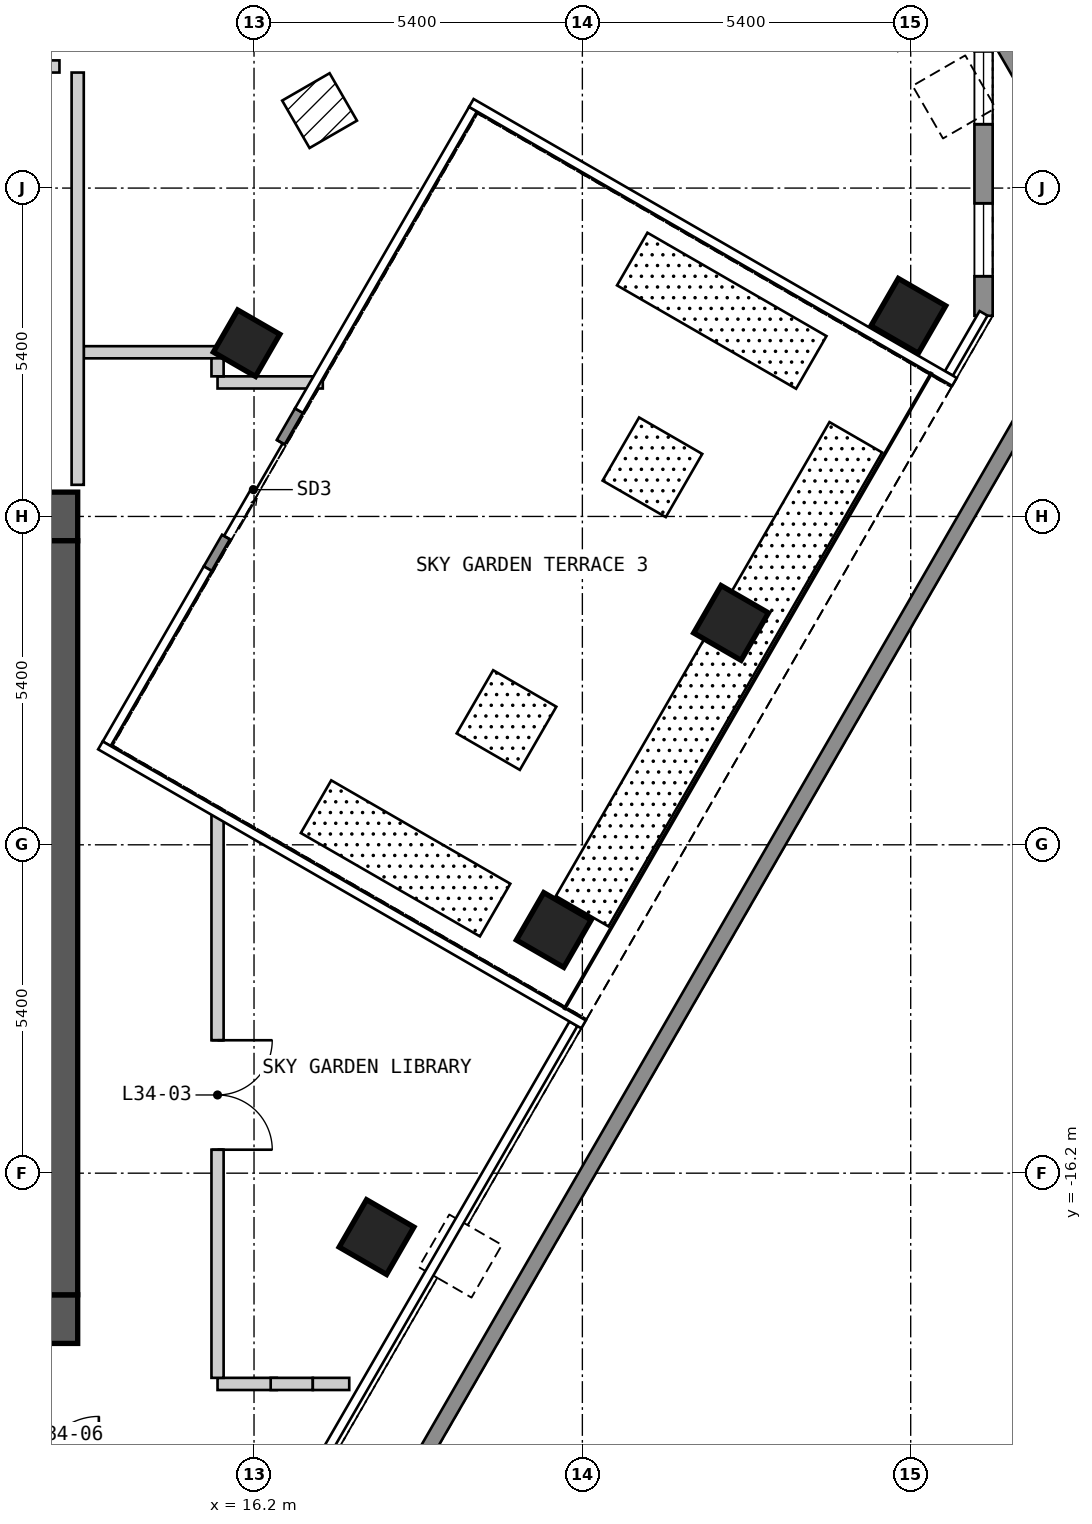
"""IFC4 building model, lengths in metres.
Left out: names, types, materials, properties, quantities, classifications, styles, units other than length and angle.
Written with IfcOpenShell. Run it as: python <this file> out.ifc"""

import sys

from ifc_helpers import new_model, si_unit, direction, frame, frame_2d, origin, origin_2d, place, context, subcontext, project, spatial, polyline, rectangle, outline, extrude, element, fill, save


model = new_model("IFC4")
c1 = context("Model", 3, precision=1e-05, world=origin(), true_north=direction((0.0, 1.0)))
c2 = subcontext(c1, "Body", "Model", "MODEL_VIEW")
j1 = project(units=[si_unit("LENGTHUNIT", "METRE"), si_unit("PLANEANGLEUNIT", "RADIAN")], contexts=[c1])
p1 = place(None, origin())
s1 = spatial("IfcSite", under=j1, at=p1, CompositionType="ELEMENT")
p2 = place(p1, origin())
s2 = spatial("IfcBuilding", under=s1, at=p2, CompositionType="ELEMENT")
p3 = place(p2, frame((0.0, 0.0, 111.6)))
s3 = spatial("IfcBuildingStorey", under=s2, at=p3, CompositionType="ELEMENT", Elevation=111.6)
for number, where, z_axis, x_axis in (
    (1, (18.215, -17.251, 0.0), (0.0, 0.0, 1.0), (0.5, 0.866, 0.0)),
    (2, (21.13, -12.201, 0.0), (0.0, 0.0, 1.0), (0.5, 0.866, 0.0)),
    (3, (24.046, -7.151, 0.0), (0.0, 0.0, 1.0), (0.5, 0.866, 0.0)),
    (4, (26.961, -2.101, 0.0), (0.0, 0.0, 1.0), (0.5, 0.866, 0.0)),
):
    element("IfcColumn", number, at=place(p3, frame(where, z_axis=z_axis, x_axis=x_axis)), inside=s3, PredefinedType="COLUMN", context=c2, shape_type="SweptSolid", body=[
        extrude(rectangle(XDim=0.9, YDim=0.9, at=origin_2d()), origin(), (0.0, 0.0, 1.0), 6.0),
    ])
p4 = place(p3, frame((16.078, -2.551, 0.0), z_axis=(0.0, 0.0, 1.0), x_axis=(0.5, 0.866025403784, 0.0)))
e5 = element("IfcColumn", 5, at=p4, inside=s3, PredefinedType="COLUMN", context=c2, shape_type="SweptSolid", body=[
    extrude(rectangle(XDim=0.8, YDim=0.8, at=origin_2d()), origin(), (0.0, 0.0, 1.0), 6.0),
])
p5 = place(p3, frame((-13.3, -18.6, 0.0), z_axis=(0.0, 0.0, 1.0), x_axis=(1.0, 0.0, 0.0)))
e6 = element("IfcWall", 6, at=p5, inside=s3, PredefinedType="SHEAR", context=c2, shape_type="SweptSolid", body=[
    extrude(rectangle(XDim=26.6, YDim=0.8, at=frame_2d((13.3, 0.0))), origin(), (0.0, 0.0, 1.0), 5.7),
])
p6 = place(p3, frame((-13.3, -5.4, 0.0), z_axis=(0.0, 0.0, 1.0), x_axis=(1.0, 0.0, 0.0)))
e7 = element("IfcWall", 7, at=p6, inside=s3, PredefinedType="SHEAR", context=c2, shape_type="SweptSolid", body=[
    extrude(rectangle(XDim=26.6, YDim=0.8, at=frame_2d((13.3, 0.0))), origin(), (0.0, 0.0, 1.0), 5.7),
])
p7 = place(p6, frame((23.65, 0.0, 0.0)))
e8 = element("IfcOpeningElement", 8, at=p7, cuts=e7, PredefinedType="OPENING", context=c2, shape_type="SweptSolid", body=[
    extrude(rectangle(XDim=1.2, YDim=2.1, at=frame_2d((0.6, 1.05))), frame((0.0, 0.41, 0.0), z_axis=(0.0, -1.0, 0.0), x_axis=(1.0, 0.0, 0.0)), (0.0, 0.0, 1.0), 0.82),
])
p8 = place(p3, frame((12.9, -18.2, 0.0), z_axis=(0.0, 0.0, 1.0), x_axis=(0.0, 1.0, 0.0)))
e9 = element("IfcWall", 9, at=p8, inside=s3, PredefinedType="SHEAR", context=c2, shape_type="SweptSolid", body=[
    extrude(rectangle(XDim=12.4, YDim=0.8, at=frame_2d((6.2, 0.0))), origin(), (0.0, 0.0, 1.0), 5.7),
])
p9 = place(p3, frame((28.198, -2.1, 0.0), z_axis=(0.0, 0.0, 1.0), x_axis=(0.0, 1.0, 0.0)))
e10 = element("IfcWall", 10, at=p9, inside=s3, PredefinedType="SOLIDWALL", context=c2, shape_type="SweptSolid", body=[
    extrude(outline(polyline([(0.0, -0.15), (5.0, -0.15), (4.92, 0.15), (0.08, 0.15), (0.0, -0.15)])), origin(), (0.0, 0.0, 1.0), 5.7),
])
p10 = place(p9, frame((0.65, 0.0, 0.15)))
e11 = element("IfcOpeningElement", 11, at=p10, cuts=e10, PredefinedType="OPENING", context=c2, shape_type="SweptSolid", body=[
    extrude(rectangle(XDim=1.2, YDim=2.1, at=frame_2d((0.6, 1.05))), frame((0.0, 0.16, 0.0), z_axis=(0.0, -1.0, 0.0), x_axis=(1.0, 0.0, 0.0)), (0.0, 0.0, 1.0), 0.32),
])
p11 = place(p9, frame((3.15, 0.0, 0.15)))
e12 = element("IfcOpeningElement", 12, at=p11, cuts=e10, PredefinedType="OPENING", context=c2, shape_type="SweptSolid", body=[
    extrude(rectangle(XDim=1.2, YDim=2.1, at=frame_2d((0.6, 1.05))), frame((0.0, 0.16, 0.0), z_axis=(0.0, -1.0, 0.0), x_axis=(1.0, 0.0, 0.0)), (0.0, 0.0, 1.0), 0.32),
])
p12 = place(p3, frame((15.439, -6.258, 0.0), z_axis=(0.0, 0.0, 1.0), x_axis=(0.499990139034, 0.866031096941, 0.0)))
e13 = element("IfcWall", 13, at=p12, inside=s3, PredefinedType="SOLIDWALL", context=c2, shape_type="SweptSolid", body=[
    extrude(rectangle(XDim=3.0, YDim=0.15, at=frame_2d((1.5, 0.0))), origin(), (0.0, 0.0, 1.0), 5.7),
])
p13 = place(p12, frame((0.6, 0.0, 0.0)))
e14 = element("IfcOpeningElement", 14, at=p13, cuts=e13, PredefinedType="OPENING", context=c2, shape_type="SweptSolid", body=[
    extrude(rectangle(XDim=1.8, YDim=2.4, at=frame_2d((0.9, 1.2))), frame((0.0, 0.085, 0.0), z_axis=(0.0, -1.0, 0.0), x_axis=(1.0, 0.0, 0.0)), (0.0, 0.0, 1.0), 0.17),
])
p14 = place(p3, frame((28.299, 2.736, 0.0), z_axis=(0.0, 0.0, 1.0), x_axis=(0.500272171574, -0.865868208418, 0.0)))
e15 = element("IfcWall", 15, at=p14, inside=s3, PredefinedType="PARAPET", context=c2, shape_type="SweptSolid", body=[
    extrude(outline(polyline([(0.0, -0.125), (1.432, -0.125), (1.499, 0.125), (0.0, 0.125), (0.0, -0.125)])), origin(), (0.0, 0.0, 1.0), 1.6),
])
p15 = place(p3, frame((29.049, -3.438, 0.0), z_axis=(0.0, 0.0, 1.0), x_axis=(-0.500085431376, -0.865976074338, 0.0)))
e16 = element("IfcWall", 16, at=p15, inside=s3, PredefinedType="PARAPET", context=c2, shape_type="SweptSolid", body=[
    extrude(outline(polyline([(0.067, -0.125), (23.027, -0.125), (23.094, 0.125), (0.0, 0.125), (0.067, -0.125)])), origin(), (0.0, 0.0, 1.0), 1.6),
])
p16 = place(p3, frame((15.6, -19.666, 0.0), z_axis=(0.0, 0.0, 1.0), x_axis=(1.0, 0.0, 0.0)))
e17 = element("IfcWall", 17, at=p16, inside=s3, PredefinedType="PARTITIONING", context=c2, shape_type="SweptSolid", body=[
    extrude(rectangle(XDim=0.974, YDim=0.2, at=frame_2d((0.487, 0.0))), origin(), (0.0, 0.0, 1.0), 5.7),
])
p17 = place(p3, frame((16.474, -19.666, 0.0), z_axis=(0.0, 0.0, 1.0), x_axis=(1.0, 0.0, 0.0)))
e18 = element("IfcWall", 18, at=p17, inside=s3, PredefinedType="PARTITIONING", context=c2, shape_type="SweptSolid", body=[
    extrude(rectangle(XDim=0.693, YDim=0.2, at=frame_2d((0.346, 0.0))), origin(), (0.0, 0.0, 1.0), 5.07),
])
p18 = place(p3, frame((17.167, -19.666, 0.0), z_axis=(0.0, 0.0, 1.0), x_axis=(1.0, 0.0, 0.0)))
e19 = element("IfcWall", 19, at=p18, inside=s3, PredefinedType="PARTITIONING", context=c2, shape_type="SweptSolid", body=[
    extrude(rectangle(XDim=0.599, YDim=0.2, at=frame_2d((0.3, 0.0))), origin(), (0.0, 0.0, 1.0), 5.7),
])
p19 = place(p3, frame((15.6, -3.196, 0.0), z_axis=(0.0, 0.0, 1.0), x_axis=(1.0, 0.0, 0.0)))
e20 = element("IfcWall", 20, at=p19, inside=s3, PredefinedType="PARTITIONING", context=c2, shape_type="SweptSolid", body=[
    extrude(rectangle(XDim=1.731, YDim=0.2, at=frame_2d((0.865, 0.0))), origin(), (0.0, 0.0, 1.0), 5.7),
])
p20 = place(p3, frame((13.4, -2.7, 0.0), z_axis=(0.0, 0.0, 1.0), x_axis=(1.0, 0.0, 0.0)))
e21 = element("IfcWall", 21, at=p20, inside=s3, PredefinedType="PARTITIONING", context=c2, shape_type="SweptSolid", body=[
    extrude(rectangle(XDim=2.3, YDim=0.2, at=frame_2d((1.15, 0.0))), origin(), (0.0, 0.0, 1.0), 5.7),
])
p21 = place(p3, frame((-12.9, 2.0, 0.0), z_axis=(0.0, 0.0, 1.0), x_axis=(1.0, 0.0, 0.0)))
e22 = element("IfcWall", 22, at=p21, inside=s3, PredefinedType="PARTITIONING", context=c2, shape_type="SweptSolid", body=[
    extrude(rectangle(XDim=25.9, YDim=0.2, at=frame_2d((12.95, 0.0))), origin(), (0.0, 0.0, 1.0), 5.7),
])
p22 = place(p21, frame((2.696, 0.0, 0.0)))
e23 = element("IfcOpeningElement", 23, at=p22, cuts=e22, PredefinedType="OPENING", context=c2, shape_type="SweptSolid", body=[
    extrude(rectangle(XDim=1.8, YDim=2.1, at=frame_2d((0.9, 1.05))), frame((0.0, 0.11, 0.0), z_axis=(0.0, -1.0, 0.0), x_axis=(1.0, 0.0, 0.0)), (0.0, 0.0, 1.0), 0.22),
])
p23 = place(p21, frame((21.304, 0.0, 0.0)))
e24 = element("IfcOpeningElement", 24, at=p23, cuts=e22, PredefinedType="OPENING", context=c2, shape_type="SweptSolid", body=[
    extrude(rectangle(XDim=1.8, YDim=2.1, at=frame_2d((0.9, 1.05))), frame((0.0, 0.11, 0.0), z_axis=(0.0, -1.0, 0.0), x_axis=(1.0, 0.0, 0.0)), (0.0, 0.0, 1.0), 0.22),
])
p24 = place(p21, frame((12.0, 0.0, 0.0)))
e25 = element("IfcOpeningElement", 25, at=p24, cuts=e22, PredefinedType="OPENING", context=c2, shape_type="SweptSolid", body=[
    extrude(rectangle(XDim=1.8, YDim=2.1, at=frame_2d((0.9, 1.05))), frame((0.0, 0.11, 0.0), z_axis=(0.0, -1.0, 0.0), x_axis=(1.0, 0.0, 0.0)), (0.0, 0.0, 1.0), 0.22),
])
p25 = place(p3, frame((13.3, -4.88, 0.0), z_axis=(0.0, 0.0, 1.0), x_axis=(0.0, 1.0, 0.0)))
e26 = element("IfcWall", 26, at=p25, inside=s3, PredefinedType="PARTITIONING", context=c2, shape_type="SweptSolid", body=[
    extrude(rectangle(XDim=6.78, YDim=0.2, at=frame_2d((3.39, 0.0))), origin(), (0.0, 0.0, 1.0), 5.7),
])
p26 = place(p3, frame((15.6, -19.566, 0.0), z_axis=(0.0, 0.0, 1.0), x_axis=(0.0, 1.0, 0.0)))
e27 = element("IfcWall", 27, at=p26, inside=s3, PredefinedType="PARTITIONING", context=c2, shape_type="SweptSolid", body=[
    extrude(rectangle(XDim=9.312, YDim=0.2, at=frame_2d((4.656, 0.0))), origin(), (0.0, 0.0, 1.0), 5.7),
])
p27 = place(p26, frame((5.552, 0.0, 0.0), z_axis=(0.0, 0.0, 1.0), x_axis=(-1.0, 0.0, 0.0)))
e28 = element("IfcOpeningElement", 28, at=p27, cuts=e27, PredefinedType="OPENING", context=c2, shape_type="SweptSolid", body=[
    extrude(rectangle(XDim=1.8, YDim=2.1, at=frame_2d((0.9, 1.05))), frame((0.0, 0.11, 0.0), z_axis=(0.0, -1.0, 0.0), x_axis=(1.0, 0.0, 0.0)), (0.0, 0.0, 1.0), 0.22),
])
p28 = place(p3, frame((15.6, -3.096, 0.0), z_axis=(0.0, 0.0, 1.0), x_axis=(0.0, 1.0, 0.0)))
e29 = element("IfcWall", 29, at=p28, inside=s3, PredefinedType="PARTITIONING", context=c2, shape_type="SweptSolid", body=[
    extrude(rectangle(XDim=0.296, YDim=0.2, at=frame_2d((0.148, 0.0))), origin(), (0.0, 0.0, 1.0), 5.7),
])
p29 = place(p10, origin())
e30 = element("IfcWindow", 30, at=p29, inside=s3, PartitioningType="SINGLE_PANEL", PredefinedType="WINDOW", context=c2, shape_type="SweptSolid", body=[
    extrude(rectangle(XDim=1.2, YDim=2.1, at=frame_2d((0.6, 1.05))), frame((0.0, 0.03, 0.0), z_axis=(0.0, -1.0, 0.0), x_axis=(1.0, 0.0, 0.0)), (0.0, 0.0, 1.0), 0.06),
])
fill(e11, e30)
p30 = place(p11, origin())
e31 = element("IfcWindow", 31, at=p30, inside=s3, PartitioningType="SINGLE_PANEL", PredefinedType="WINDOW", context=c2, shape_type="SweptSolid", body=[
    extrude(rectangle(XDim=1.2, YDim=2.1, at=frame_2d((0.6, 1.05))), frame((0.0, 0.03, 0.0), z_axis=(0.0, -1.0, 0.0), x_axis=(1.0, 0.0, 0.0)), (0.0, 0.0, 1.0), 0.06),
])
fill(e12, e31)
p31 = place(p13, origin())
e32 = element("IfcDoor", 32, at=p31, inside=s3, OperationType="SLIDING_TO_LEFT", PredefinedType="DOOR", context=c2, shape_type="SweptSolid", body=[
    extrude(rectangle(XDim=1.8, YDim=2.4, at=frame_2d((0.9, 1.2))), frame((0.0, 0.025, 0.0), z_axis=(0.0, -1.0, 0.0), x_axis=(1.0, 0.0, 0.0)), (0.0, 0.0, 1.0), 0.05),
])
fill(e14, e32)
p32 = place(p27, origin())
e33 = element("IfcDoor", 33, at=p32, inside=s3, OperationType="DOUBLE_DOOR_SINGLE_SWING", PredefinedType="DOOR", context=c2, shape_type="SweptSolid", body=[
    extrude(rectangle(XDim=1.8, YDim=2.1, at=frame_2d((0.9, 1.05))), frame((0.0, 0.025, 0.0), z_axis=(0.0, -1.0, 0.0), x_axis=(1.0, 0.0, 0.0)), (0.0, 0.0, 1.0), 0.05),
])
fill(e28, e33)
save(model, sys.argv[1])
